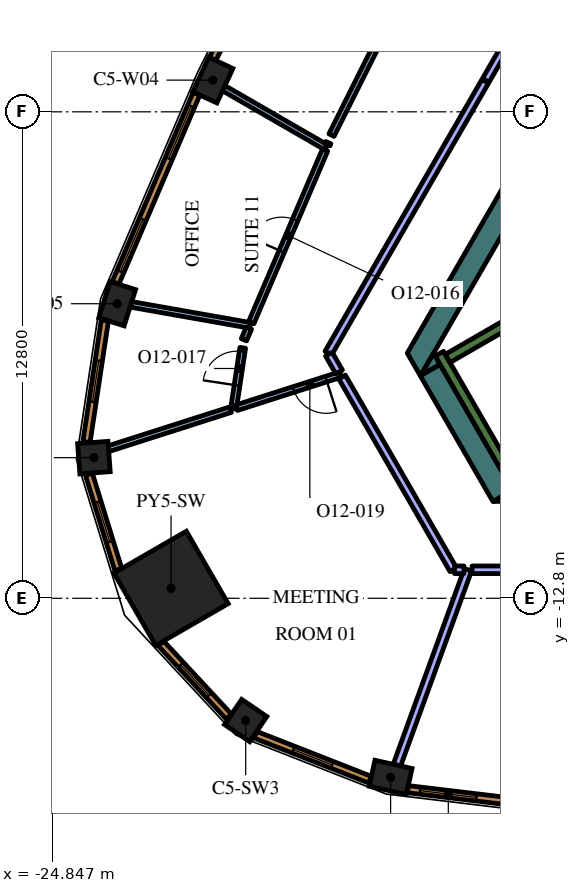
"""IFC4 building model, lengths in metres.
Left out: names, types, materials, properties, quantities, classifications, styles, units other than length and angle.
Written with IfcOpenShell. Run it as: python <this file> out.ifc"""

import sys

from ifc_helpers import new_model, si_unit, direction, frame, frame_2d, origin, origin_2d, place, context, subcontext, project, spatial, polyline, rectangle, outline, extrude, element, fill, save


model = new_model("IFC4")
c1 = context("Model", 3, precision=1e-05, world=origin(), true_north=direction((0.0, 1.0)))
c2 = subcontext(c1, "Body", "Model", "MODEL_VIEW")
j1 = project(units=[si_unit("LENGTHUNIT", "METRE"), si_unit("PLANEANGLEUNIT", "RADIAN")], contexts=[c1])
p1 = place(None, origin())
s1 = spatial("IfcSite", under=j1, at=p1, CompositionType="ELEMENT")
p2 = place(p1, origin())
s2 = spatial("IfcBuilding", under=s1, at=p2, CompositionType="ELEMENT")
p3 = place(p2, frame((0.0, 0.0, 288.0)))
s3 = spatial("IfcBuildingStorey", under=s2, at=p3, CompositionType="ELEMENT", Elevation=288.0)
p4 = place(p3, frame((-21.718, -12.539, 0.0), z_axis=(0.0, 0.0, 1.0), x_axis=(-0.866025403784, -0.5, 0.0)))
e1 = element("IfcColumn", 1, at=p4, inside=s3, PredefinedType="COLUMN", context=c2, shape_type="SweptSolid", body=[
    extrude(rectangle(XDim=2.2, YDim=2.2, at=origin_2d()), origin(), (0.0, 0.0, 1.0), 4.2),
])
for number, where, z_axis, x_axis in (
    (2, (-15.941, -17.512, 0.0), (0.0, 0.0, 1.0), (0.976, -0.217, 0.0)),
    (3, (-20.619, 0.834, 0.0), (0.0, 0.0, 1.0), (-0.421, -0.907, 0.0)),
    (4, (-23.136, -5.049, 0.0), (0.0, 0.0, 1.0), (-0.3, -0.954, 0.0)),
):
    element("IfcColumn", number, at=place(p3, frame(where, z_axis=z_axis, x_axis=x_axis)), inside=s3, PredefinedType="COLUMN", context=c2, shape_type="SweptSolid", body=[
        extrude(rectangle(XDim=1.0, YDim=0.7, at=origin_2d()), origin(), (0.0, 0.0, 1.0), 4.2),
    ])
for number, where, z_axis, x_axis in (
    (5, (-23.748, -9.1, 0.0), (0.0, 0.0, 1.0), (0.075, -0.997, 0.0)),
    (6, (-19.754, -16.017, 0.0), (0.0, 0.0, 1.0), (0.826, -0.563, 0.0)),
):
    element("IfcColumn", number, at=place(p3, frame(where, z_axis=z_axis, x_axis=x_axis)), inside=s3, PredefinedType="COLUMN", context=c2, shape_type="SweptSolid", body=[
        extrude(rectangle(XDim=0.8, YDim=0.8, at=origin_2d()), origin(), (0.0, 0.0, 1.0), 4.2),
    ])
p5 = place(p3, origin())
e7 = element("IfcWall", 7, at=p5, inside=s3, PredefinedType="SOLIDWALL", context=c2, shape_type="SweptSolid", body=[
    extrude(outline(polyline([(-15.502, -6.35), (-4.912, 11.992), (-4.393, 11.692), (-10.815, 0.569), (-10.84, 0.583), (-10.84, 0.583), (-10.84, 0.583), (-10.965, 0.367), (-10.965, 0.367), (-10.965, 0.367), (-10.94, 0.352), (-11.033, 0.191), (-14.809, -6.35), (-15.156, -6.95), (-15.502, -6.35)])), origin(), (0.0, 0.0, 1.0), 4.2),
])
p6 = place(p3, frame((-14.899, -6.795, 0.0), z_axis=(0.0, 0.0, 1.0), x_axis=(0.499950938802, -0.866053727428, 0.0)))
e8 = element("IfcWall", 8, at=p6, inside=s3, PredefinedType="SOLIDWALL", context=c2, shape_type="SweptSolid", body=[
    extrude(rectangle(XDim=3.823, YDim=0.6, at=frame_2d((1.912, 0.0))), origin(), (0.0, 0.0, 1.0), 4.2),
])
e9 = element("IfcWall", 9, at=p5, inside=s3, PredefinedType="SOLIDWALL", context=c2, shape_type="SweptSolid", body=[
    extrude(outline(polyline([(-14.64, -6.643), (-15.147, -6.936), (-14.809, -6.35), (-14.64, -6.643)])), origin(), (0.0, 0.0, 1.0), 4.2),
])
e10 = element("IfcWall", 10, at=p5, inside=s3, PredefinedType="SOLIDWALL", context=c2, shape_type="SweptSolid", body=[
    extrude(outline(polyline([(-12.557, -10.25), (-13.233, -10.25), (-12.726, -9.957), (-12.557, -10.25)])), origin(), (0.0, 0.0, 1.0), 4.2),
])
p7 = place(p3, frame((-12.84, -9.511, 0.0), z_axis=(0.0, 0.0, 1.0), x_axis=(-0.499997733992, 0.866026712061, 0.0)))
e11 = element("IfcWall", 11, at=p7, inside=s3, PredefinedType="SOLIDWALL", context=c2, shape_type="SweptSolid", body=[
    extrude(rectangle(XDim=3.634, YDim=0.25, at=frame_2d((1.817, 0.0))), origin(), (0.0, 0.0, 1.0), 4.2),
])
p8 = place(p3, frame((-14.44, -6.49, 0.0), z_axis=(0.0, 0.0, 1.0), x_axis=(0.866022966069, 0.500004222222, 0.0)))
e12 = element("IfcWall", 12, at=p8, inside=s3, PredefinedType="SOLIDWALL", context=c2, shape_type="SweptSolid", body=[
    extrude(rectangle(XDim=6.8, YDim=0.25, at=frame_2d((3.4, 0.0))), origin(), (0.0, 0.0, 1.0), 4.2),
])
p9 = place(p3, frame((-15.774, -17.19, 0.0), z_axis=(0.0, 0.0, 1.0), x_axis=(0.341821907823, 0.93976474893, 0.0)))
e13 = element("IfcWall", 13, at=p9, inside=s3, PredefinedType="PARTITIONING", context=c2, shape_type="SweptSolid", body=[
    extrude(rectangle(XDim=5.469, YDim=0.2, at=frame_2d((2.735, 0.0))), origin(), (0.0, 0.0, 1.0), 3.55),
])
p10 = place(p3, frame((-13.799, -12.05, 0.0), z_axis=(0.0, 0.0, 1.0), x_axis=(1.0, 0.0, 0.0)))
e14 = element("IfcWall", 14, at=p10, inside=s3, PredefinedType="PARTITIONING", context=c2, shape_type="SweptSolid", body=[
    extrude(rectangle(XDim=7.303, YDim=0.2, at=frame_2d((3.652, 0.0))), origin(), (0.0, 0.0, 1.0), 3.55),
])
p11 = place(p3, frame((-17.635, -0.936, 0.0), z_axis=(0.0, 0.0, 1.0), x_axis=(-0.866044607523, 0.499966736674, 0.0)))
e15 = element("IfcWall", 15, at=p11, inside=s3, PredefinedType="PARTITIONING", context=c2, shape_type="SweptSolid", body=[
    extrude(rectangle(XDim=3.115, YDim=0.15, at=frame_2d((1.557, 0.0))), origin(), (0.0, 0.0, 1.0), 3.55),
])
p12 = place(p3, frame((-17.497, -0.613, 0.0), z_axis=(0.0, 0.0, 1.0), x_axis=(0.447480081559, 0.89429389834, 0.0)))
e16 = element("IfcWall", 16, at=p12, inside=s3, PredefinedType="PARTITIONING", context=c2, shape_type="SweptSolid", body=[
    extrude(rectangle(XDim=5.863, YDim=0.15, at=frame_2d((2.931, 0.0))), origin(), (0.0, 0.0, 1.0), 3.55),
])
p13 = place(p12, frame((2.463, 0.0, 0.0)))
e17 = element("IfcOpeningElement", 17, at=p13, cuts=e16, PredefinedType="OPENING", context=c2, shape_type="SweptSolid", body=[
    extrude(rectangle(XDim=0.9, YDim=2.1, at=frame_2d((0.45, 1.05))), frame((0.0, 0.085, 0.0), z_axis=(0.0, -1.0, 0.0), x_axis=(1.0, 0.0, 0.0)), (0.0, 0.0, 1.0), 0.17),
])
p14 = place(p3, frame((-17.581, -0.81, 0.0), z_axis=(0.0, 0.0, 1.0), x_axis=(-0.390033474923, -0.92080067791, 0.0)))
e18 = element("IfcWall", 18, at=p14, inside=s3, PredefinedType="PARTITIONING", context=c2, shape_type="SweptSolid", body=[
    extrude(rectangle(XDim=0.061, YDim=0.15, at=frame_2d((0.03, 0.0))), origin(), (0.0, 0.0, 1.0), 3.55),
])
p15 = place(p3, frame((-19.639, -5.62, 0.0), z_axis=(0.0, 0.0, 1.0), x_axis=(-0.984765028635, 0.173890305586, 0.0)))
e19 = element("IfcWall", 19, at=p15, inside=s3, PredefinedType="PARTITIONING", context=c2, shape_type="SweptSolid", body=[
    extrude(rectangle(XDim=3.184, YDim=0.15, at=frame_2d((1.592, 0.0))), origin(), (0.0, 0.0, 1.0), 3.55),
])
p16 = place(p3, frame((-19.608, -5.549, 0.0), z_axis=(0.0, 0.0, 1.0), x_axis=(0.393352855097, 0.919387584964, 0.0)))
e20 = element("IfcWall", 20, at=p16, inside=s3, PredefinedType="PARTITIONING", context=c2, shape_type="SweptSolid", body=[
    extrude(rectangle(XDim=4.942, YDim=0.15, at=frame_2d((2.471, 0.0))), origin(), (0.0, 0.0, 1.0), 3.55),
])
p17 = place(p16, frame((2.042, 0.0, 0.0)))
e21 = element("IfcOpeningElement", 21, at=p17, cuts=e20, PredefinedType="OPENING", context=c2, shape_type="SweptSolid", body=[
    extrude(rectangle(XDim=0.9, YDim=2.1, at=frame_2d((0.45, 1.05))), frame((0.0, 0.085, 0.0), z_axis=(0.0, -1.0, 0.0), x_axis=(1.0, 0.0, 0.0)), (0.0, 0.0, 1.0), 0.17),
])
p18 = place(p3, frame((-19.669, -5.69, 0.0), z_axis=(0.0, 0.0, 1.0), x_axis=(-0.393566769146, -0.919296034052, 0.0)))
e22 = element("IfcWall", 22, at=p18, inside=s3, PredefinedType="PARTITIONING", context=c2, shape_type="SweptSolid", body=[
    extrude(rectangle(XDim=0.334, YDim=0.15, at=frame_2d((0.167, 0.0))), origin(), (0.0, 0.0, 1.0), 3.55),
])
p19 = place(p3, frame((-20.074, -7.812, 0.0), z_axis=(0.0, 0.0, 1.0), x_axis=(0.149305499664, 0.988791114326, 0.0)))
e23 = element("IfcWall", 23, at=p19, inside=s3, PredefinedType="PARTITIONING", context=c2, shape_type="SweptSolid", body=[
    extrude(rectangle(XDim=1.62, YDim=0.15, at=frame_2d((0.81, 0.0))), origin(), (0.0, 0.0, 1.0), 3.55),
])
p20 = place(p19, frame((0.621, 0.0, 0.0)))
e24 = element("IfcOpeningElement", 24, at=p20, cuts=e23, PredefinedType="OPENING", context=c2, shape_type="SweptSolid", body=[
    extrude(rectangle(XDim=0.9, YDim=2.1, at=frame_2d((0.45, 1.05))), frame((0.0, 0.085, 0.0), z_axis=(0.0, -1.0, 0.0), x_axis=(1.0, 0.0, 0.0)), (0.0, 0.0, 1.0), 0.17),
])
p21 = place(p3, frame((-20.154, -7.838, 0.0), z_axis=(0.0, 0.0, 1.0), x_axis=(-0.952501497002, -0.304533903217, 0.0)))
e25 = element("IfcWall", 25, at=p21, inside=s3, PredefinedType="PARTITIONING", context=c2, shape_type="SweptSolid", body=[
    extrude(rectangle(XDim=3.37, YDim=0.15, at=frame_2d((1.685, 0.0))), origin(), (0.0, 0.0, 1.0), 3.55),
])
p22 = place(p3, frame((-17.256, -6.911, 0.0), z_axis=(0.0, 0.0, 1.0), x_axis=(-0.95247639241, -0.304612412587, 0.0)))
e26 = element("IfcWall", 26, at=p22, inside=s3, PredefinedType="PARTITIONING", context=c2, shape_type="SweptSolid", body=[
    extrude(rectangle(XDim=2.875, YDim=0.15, at=frame_2d((1.438, 0.0))), origin(), (0.0, 0.0, 1.0), 3.55),
])
p23 = place(p22, frame((0.4, 0.0, 0.0)))
e27 = element("IfcOpeningElement", 27, at=p23, cuts=e26, PredefinedType="OPENING", context=c2, shape_type="SweptSolid", body=[
    extrude(rectangle(XDim=0.9, YDim=2.1, at=frame_2d((0.45, 1.05))), frame((0.0, 0.085, 0.0), z_axis=(0.0, -1.0, 0.0), x_axis=(1.0, 0.0, 0.0)), (0.0, 0.0, 1.0), 0.17),
])
p24 = place(p3, frame((-7.436, 11.221, 0.0), z_axis=(0.0, 0.0, 1.0), x_axis=(-0.49999894854, -0.866026010844, 0.0)))
e28 = element("IfcWall", 28, at=p24, inside=s3, PredefinedType="PARTITIONING", context=c2, shape_type="SweptSolid", body=[
    extrude(rectangle(XDim=12.0, YDim=0.2, at=frame_2d((6.0, 0.0))), origin(), (0.0, 0.0, 1.0), 3.55),
])
p25 = place(p24, frame((5.5, 0.0, 0.0)))
e29 = element("IfcOpeningElement", 29, at=p25, cuts=e28, PredefinedType="OPENING", context=c2, shape_type="SweptSolid", body=[
    extrude(rectangle(XDim=1.0, YDim=2.1, at=frame_2d((0.5, 1.05))), frame((0.0, 0.11, 0.0), z_axis=(0.0, -1.0, 0.0), x_axis=(1.0, 0.0, 0.0)), (0.0, 0.0, 1.0), 0.22),
])
p26 = place(p3, frame((-13.451, 0.803, 0.0), z_axis=(0.0, 0.0, 1.0), x_axis=(-0.499982585408, -0.86603545787, 0.0)))
e30 = element("IfcWall", 30, at=p26, inside=s3, PredefinedType="PARTITIONING", context=c2, shape_type="SweptSolid", body=[
    extrude(rectangle(XDim=8.26, YDim=0.2, at=frame_2d((4.13, 0.0))), origin(), (0.0, 0.0, 1.0), 3.55),
])
p27 = place(p3, frame((-17.565, -6.376, 0.0), z_axis=(0.0, 0.0, 1.0), x_axis=(0.499683376352, -0.866208129376, 0.0)))
e31 = element("IfcWall", 31, at=p27, inside=s3, PredefinedType="PARTITIONING", context=c2, shape_type="SweptSolid", body=[
    extrude(rectangle(XDim=0.541, YDim=0.2, at=frame_2d((0.271, 0.0))), origin(), (0.0, 0.0, 1.0), 3.55),
])
p28 = place(p3, frame((-17.218, -6.978, 0.0), z_axis=(0.0, 0.0, 1.0), x_axis=(0.500012299885, -0.866018302326, 0.0)))
e32 = element("IfcWall", 32, at=p28, inside=s3, PredefinedType="PARTITIONING", context=c2, shape_type="SweptSolid", body=[
    extrude(rectangle(XDim=5.857, YDim=0.2, at=frame_2d((2.929, 0.0))), origin(), (0.0, 0.0, 1.0), 3.55),
])
p29 = place(p3, frame((-14.26, -12.05, 0.0), z_axis=(0.0, 0.0, 1.0), x_axis=(1.0, 0.0, 0.0)))
e33 = element("IfcWall", 33, at=p29, inside=s3, PredefinedType="PARTITIONING", context=c2, shape_type="SweptSolid", body=[
    extrude(rectangle(XDim=0.248, YDim=0.2, at=frame_2d((0.124, 0.0))), origin(), (0.0, 0.0, 1.0), 3.55),
])
p30 = place(p3, frame((-15.487, -17.823, 0.0), z_axis=(0.0, 0.0, 1.0), x_axis=(0.992885582795, -0.119072328769, 0.0)))
e34 = element("IfcWall", 34, at=p30, inside=s3, PredefinedType="SOLIDWALL", context=c2, shape_type="SweptSolid", body=[
    extrude(rectangle(XDim=5.415, YDim=0.19, at=frame_2d((2.708, 0.0))), origin(), (0.0, 0.0, 1.0), 3.95),
])
p31 = place(p30, frame((0.323, 0.0, 0.6)))
e35 = element("IfcOpeningElement", 35, at=p31, cuts=e34, PredefinedType="OPENING", context=c2, shape_type="SweptSolid", body=[
    extrude(rectangle(XDim=1.5, YDim=2.85, at=frame_2d((0.75, 1.425))), frame((0.0, 0.105, 0.0), z_axis=(0.0, -1.0, 0.0), x_axis=(1.0, 0.0, 0.0)), (0.0, 0.0, 1.0), 0.21),
])
p32 = place(p30, frame((3.558, 0.0, 0.6)))
e36 = element("IfcOpeningElement", 36, at=p32, cuts=e34, PredefinedType="OPENING", context=c2, shape_type="SweptSolid", body=[
    extrude(rectangle(XDim=1.5, YDim=2.85, at=frame_2d((0.75, 1.425))), frame((0.0, 0.105, 0.0), z_axis=(0.0, -1.0, 0.0), x_axis=(1.0, 0.0, 0.0)), (0.0, 0.0, 1.0), 0.21),
])
p33 = place(p3, frame((-18.206, 6.227, 0.0), z_axis=(0.0, 0.0, 1.0), x_axis=(-0.447484531401, -0.894291671747, 0.0)))
e37 = element("IfcWall", 37, at=p33, inside=s3, PredefinedType="SOLIDWALL", context=c2, shape_type="SweptSolid", body=[
    extrude(rectangle(XDim=5.406, YDim=0.19, at=frame_2d((2.703, 0.0))), origin(), (0.0, 0.0, 1.0), 3.95),
])
p34 = place(p33, frame((0.346, 0.0, 0.6)))
e38 = element("IfcOpeningElement", 38, at=p34, cuts=e37, PredefinedType="OPENING", context=c2, shape_type="SweptSolid", body=[
    extrude(rectangle(XDim=1.5, YDim=2.85, at=frame_2d((0.75, 1.425))), frame((0.0, 0.105, 0.0), z_axis=(0.0, -1.0, 0.0), x_axis=(1.0, 0.0, 0.0)), (0.0, 0.0, 1.0), 0.21),
])
p35 = place(p33, frame((3.559, 0.0, 0.6)))
e39 = element("IfcOpeningElement", 39, at=p35, cuts=e37, PredefinedType="OPENING", context=c2, shape_type="SweptSolid", body=[
    extrude(rectangle(XDim=1.5, YDim=2.85, at=frame_2d((0.75, 1.425))), frame((0.0, 0.105, 0.0), z_axis=(0.0, -1.0, 0.0), x_axis=(1.0, 0.0, 0.0)), (0.0, 0.0, 1.0), 0.21),
])
p36 = place(p3, frame((-21.049, 0.478, 0.0), z_axis=(0.0, 0.0, 1.0), x_axis=(-0.393347848476, -0.919389726992, 0.0)))
e40 = element("IfcWall", 40, at=p36, inside=s3, PredefinedType="SOLIDWALL", context=c2, shape_type="SweptSolid", body=[
    extrude(rectangle(XDim=5.415, YDim=0.19, at=frame_2d((2.708, 0.0))), origin(), (0.0, 0.0, 1.0), 3.95),
])
p37 = place(p36, frame((0.357, 0.0, 0.6)))
e41 = element("IfcOpeningElement", 41, at=p37, cuts=e40, PredefinedType="OPENING", context=c2, shape_type="SweptSolid", body=[
    extrude(rectangle(XDim=1.5, YDim=2.85, at=frame_2d((0.75, 1.425))), frame((0.0, 0.105, 0.0), z_axis=(0.0, -1.0, 0.0), x_axis=(1.0, 0.0, 0.0)), (0.0, 0.0, 1.0), 0.21),
])
p38 = place(p36, frame((3.593, 0.0, 0.6)))
e42 = element("IfcOpeningElement", 42, at=p38, cuts=e40, PredefinedType="OPENING", context=c2, shape_type="SweptSolid", body=[
    extrude(rectangle(XDim=1.5, YDim=2.85, at=frame_2d((0.75, 1.425))), frame((0.0, 0.105, 0.0), z_axis=(0.0, -1.0, 0.0), x_axis=(1.0, 0.0, 0.0)), (0.0, 0.0, 1.0), 0.21),
])
p39 = place(p3, frame((-23.46, -5.488, 0.0), z_axis=(0.0, 0.0, 1.0), x_axis=(-0.149421055602, -0.988773658702, 0.0)))
e43 = element("IfcWall", 43, at=p39, inside=s3, PredefinedType="SOLIDWALL", context=c2, shape_type="SweptSolid", body=[
    extrude(rectangle(XDim=3.237, YDim=0.19, at=frame_2d((1.618, 0.0))), origin(), (0.0, 0.0, 1.0), 3.95),
])
p40 = place(p39, frame((1.068, 0.0, 0.6)))
e44 = element("IfcOpeningElement", 44, at=p40, cuts=e43, PredefinedType="OPENING", context=c2, shape_type="SweptSolid", body=[
    extrude(rectangle(XDim=1.1, YDim=2.85, at=frame_2d((0.55, 1.425))), frame((0.0, 0.105, 0.0), z_axis=(0.0, -1.0, 0.0), x_axis=(1.0, 0.0, 0.0)), (0.0, 0.0, 1.0), 0.21),
])
p41 = place(p3, frame((-23.881, -9.535, 0.0), z_axis=(0.0, 0.0, 1.0), x_axis=(0.294706210429, -0.9555879078, 0.0)))
e45 = element("IfcWall", 45, at=p41, inside=s3, PredefinedType="SOLIDWALL", context=c2, shape_type="SweptSolid", body=[
    extrude(rectangle(XDim=2.627, YDim=0.19, at=frame_2d((1.313, 0.0))), origin(), (0.0, 0.0, 1.0), 3.95),
])
p42 = place(p41, frame((0.763, 0.0, 0.6)))
e46 = element("IfcOpeningElement", 46, at=p42, cuts=e45, PredefinedType="OPENING", context=c2, shape_type="SweptSolid", body=[
    extrude(rectangle(XDim=1.1, YDim=2.85, at=frame_2d((0.55, 1.425))), frame((0.0, 0.105, 0.0), z_axis=(0.0, -1.0, 0.0), x_axis=(1.0, 0.0, 0.0)), (0.0, 0.0, 1.0), 0.21),
])
p43 = place(p3, frame((-21.985, -13.988, 0.0), z_axis=(0.0, 0.0, 1.0), x_axis=(0.680219354823, -0.733008614768, 0.0)))
e47 = element("IfcWall", 47, at=p43, inside=s3, PredefinedType="SOLIDWALL", context=c2, shape_type="SweptSolid", body=[
    extrude(rectangle(XDim=2.627, YDim=0.19, at=frame_2d((1.313, 0.0))), origin(), (0.0, 0.0, 1.0), 3.95),
])
p44 = place(p43, frame((0.763, 0.0, 0.6)))
e48 = element("IfcOpeningElement", 48, at=p44, cuts=e47, PredefinedType="OPENING", context=c2, shape_type="SweptSolid", body=[
    extrude(rectangle(XDim=1.1, YDim=2.85, at=frame_2d((0.55, 1.425))), frame((0.0, 0.105, 0.0), z_axis=(0.0, -1.0, 0.0), x_axis=(1.0, 0.0, 0.0)), (0.0, 0.0, 1.0), 0.21),
])
p45 = place(p3, frame((-19.496, -16.392, 0.0), z_axis=(0.0, 0.0, 1.0), x_axis=(0.93100888477, -0.364996515709, 0.0)))
e49 = element("IfcWall", 49, at=p45, inside=s3, PredefinedType="SOLIDWALL", context=c2, shape_type="SweptSolid", body=[
    extrude(rectangle(XDim=3.237, YDim=0.19, at=frame_2d((1.618, 0.0))), origin(), (0.0, 0.0, 1.0), 3.95),
])
p46 = place(p45, frame((1.068, 0.0, 0.6)))
e50 = element("IfcOpeningElement", 50, at=p46, cuts=e49, PredefinedType="OPENING", context=c2, shape_type="SweptSolid", body=[
    extrude(rectangle(XDim=1.1, YDim=2.85, at=frame_2d((0.55, 1.425))), frame((0.0, 0.105, 0.0), z_axis=(0.0, -1.0, 0.0), x_axis=(1.0, 0.0, 0.0)), (0.0, 0.0, 1.0), 0.21),
])
p47 = place(p17, origin())
e51 = element("IfcDoor", 51, at=p47, inside=s3, OperationType="SINGLE_SWING_RIGHT", PredefinedType="DOOR", context=c2, shape_type="SweptSolid", body=[
    extrude(rectangle(XDim=0.9, YDim=2.1, at=frame_2d((0.45, 1.05))), frame((0.0, 0.025, 0.0), z_axis=(0.0, -1.0, 0.0), x_axis=(1.0, 0.0, 0.0)), (0.0, 0.0, 1.0), 0.05),
])
fill(e21, e51)
p48 = place(p20, origin())
e52 = element("IfcDoor", 52, at=p48, inside=s3, OperationType="SINGLE_SWING_RIGHT", PredefinedType="DOOR", context=c2, shape_type="SweptSolid", body=[
    extrude(rectangle(XDim=0.9, YDim=2.1, at=frame_2d((0.45, 1.05))), frame((0.0, 0.025, 0.0), z_axis=(0.0, -1.0, 0.0), x_axis=(1.0, 0.0, 0.0)), (0.0, 0.0, 1.0), 0.05),
])
fill(e24, e52)
p49 = place(p23, origin())
e53 = element("IfcDoor", 53, at=p49, inside=s3, OperationType="SINGLE_SWING_LEFT", PredefinedType="DOOR", context=c2, shape_type="SweptSolid", body=[
    extrude(rectangle(XDim=0.9, YDim=2.1, at=frame_2d((0.45, 1.05))), frame((0.0, 0.025, 0.0), z_axis=(0.0, -1.0, 0.0), x_axis=(1.0, 0.0, 0.0)), (0.0, 0.0, 1.0), 0.05),
])
fill(e27, e53)
p50 = place(p31, origin())
e54 = element("IfcWindow", 54, at=p50, inside=s3, PartitioningType="SINGLE_PANEL", PredefinedType="WINDOW", context=c2, shape_type="SweptSolid", body=[
    extrude(rectangle(XDim=1.5, YDim=2.85, at=frame_2d((0.75, 1.425))), frame((0.0, 0.045, 0.0), z_axis=(0.0, -1.0, 0.0), x_axis=(1.0, 0.0, 0.0)), (0.0, 0.0, 1.0), 0.06),
])
fill(e35, e54)
p51 = place(p37, origin())
e55 = element("IfcWindow", 55, at=p51, inside=s3, PartitioningType="SINGLE_PANEL", PredefinedType="WINDOW", context=c2, shape_type="SweptSolid", body=[
    extrude(rectangle(XDim=1.5, YDim=2.85, at=frame_2d((0.75, 1.425))), frame((0.0, 0.045, 0.0), z_axis=(0.0, -1.0, 0.0), x_axis=(1.0, 0.0, 0.0)), (0.0, 0.0, 1.0), 0.06),
])
fill(e41, e55)
p52 = place(p38, origin())
e56 = element("IfcWindow", 56, at=p52, inside=s3, PartitioningType="SINGLE_PANEL", PredefinedType="WINDOW", context=c2, shape_type="SweptSolid", body=[
    extrude(rectangle(XDim=1.5, YDim=2.85, at=frame_2d((0.75, 1.425))), frame((0.0, 0.045, 0.0), z_axis=(0.0, -1.0, 0.0), x_axis=(1.0, 0.0, 0.0)), (0.0, 0.0, 1.0), 0.06),
])
fill(e42, e56)
p53 = place(p40, origin())
e57 = element("IfcWindow", 57, at=p53, inside=s3, PartitioningType="SINGLE_PANEL", PredefinedType="WINDOW", context=c2, shape_type="SweptSolid", body=[
    extrude(rectangle(XDim=1.1, YDim=2.85, at=frame_2d((0.55, 1.425))), frame((0.0, 0.045, 0.0), z_axis=(0.0, -1.0, 0.0), x_axis=(1.0, 0.0, 0.0)), (0.0, 0.0, 1.0), 0.06),
])
fill(e44, e57)
p54 = place(p42, origin())
e58 = element("IfcWindow", 58, at=p54, inside=s3, PartitioningType="SINGLE_PANEL", PredefinedType="WINDOW", context=c2, shape_type="SweptSolid", body=[
    extrude(rectangle(XDim=1.1, YDim=2.85, at=frame_2d((0.55, 1.425))), frame((0.0, 0.045, 0.0), z_axis=(0.0, -1.0, 0.0), x_axis=(1.0, 0.0, 0.0)), (0.0, 0.0, 1.0), 0.06),
])
fill(e46, e58)
p55 = place(p44, origin())
e59 = element("IfcWindow", 59, at=p55, inside=s3, PartitioningType="SINGLE_PANEL", PredefinedType="WINDOW", context=c2, shape_type="SweptSolid", body=[
    extrude(rectangle(XDim=1.1, YDim=2.85, at=frame_2d((0.55, 1.425))), frame((0.0, 0.045, 0.0), z_axis=(0.0, -1.0, 0.0), x_axis=(1.0, 0.0, 0.0)), (0.0, 0.0, 1.0), 0.06),
])
fill(e48, e59)
p56 = place(p46, origin())
e60 = element("IfcWindow", 60, at=p56, inside=s3, PartitioningType="SINGLE_PANEL", PredefinedType="WINDOW", context=c2, shape_type="SweptSolid", body=[
    extrude(rectangle(XDim=1.1, YDim=2.85, at=frame_2d((0.55, 1.425))), frame((0.0, 0.045, 0.0), z_axis=(0.0, -1.0, 0.0), x_axis=(1.0, 0.0, 0.0)), (0.0, 0.0, 1.0), 0.06),
])
fill(e50, e60)
save(model, sys.argv[1])
